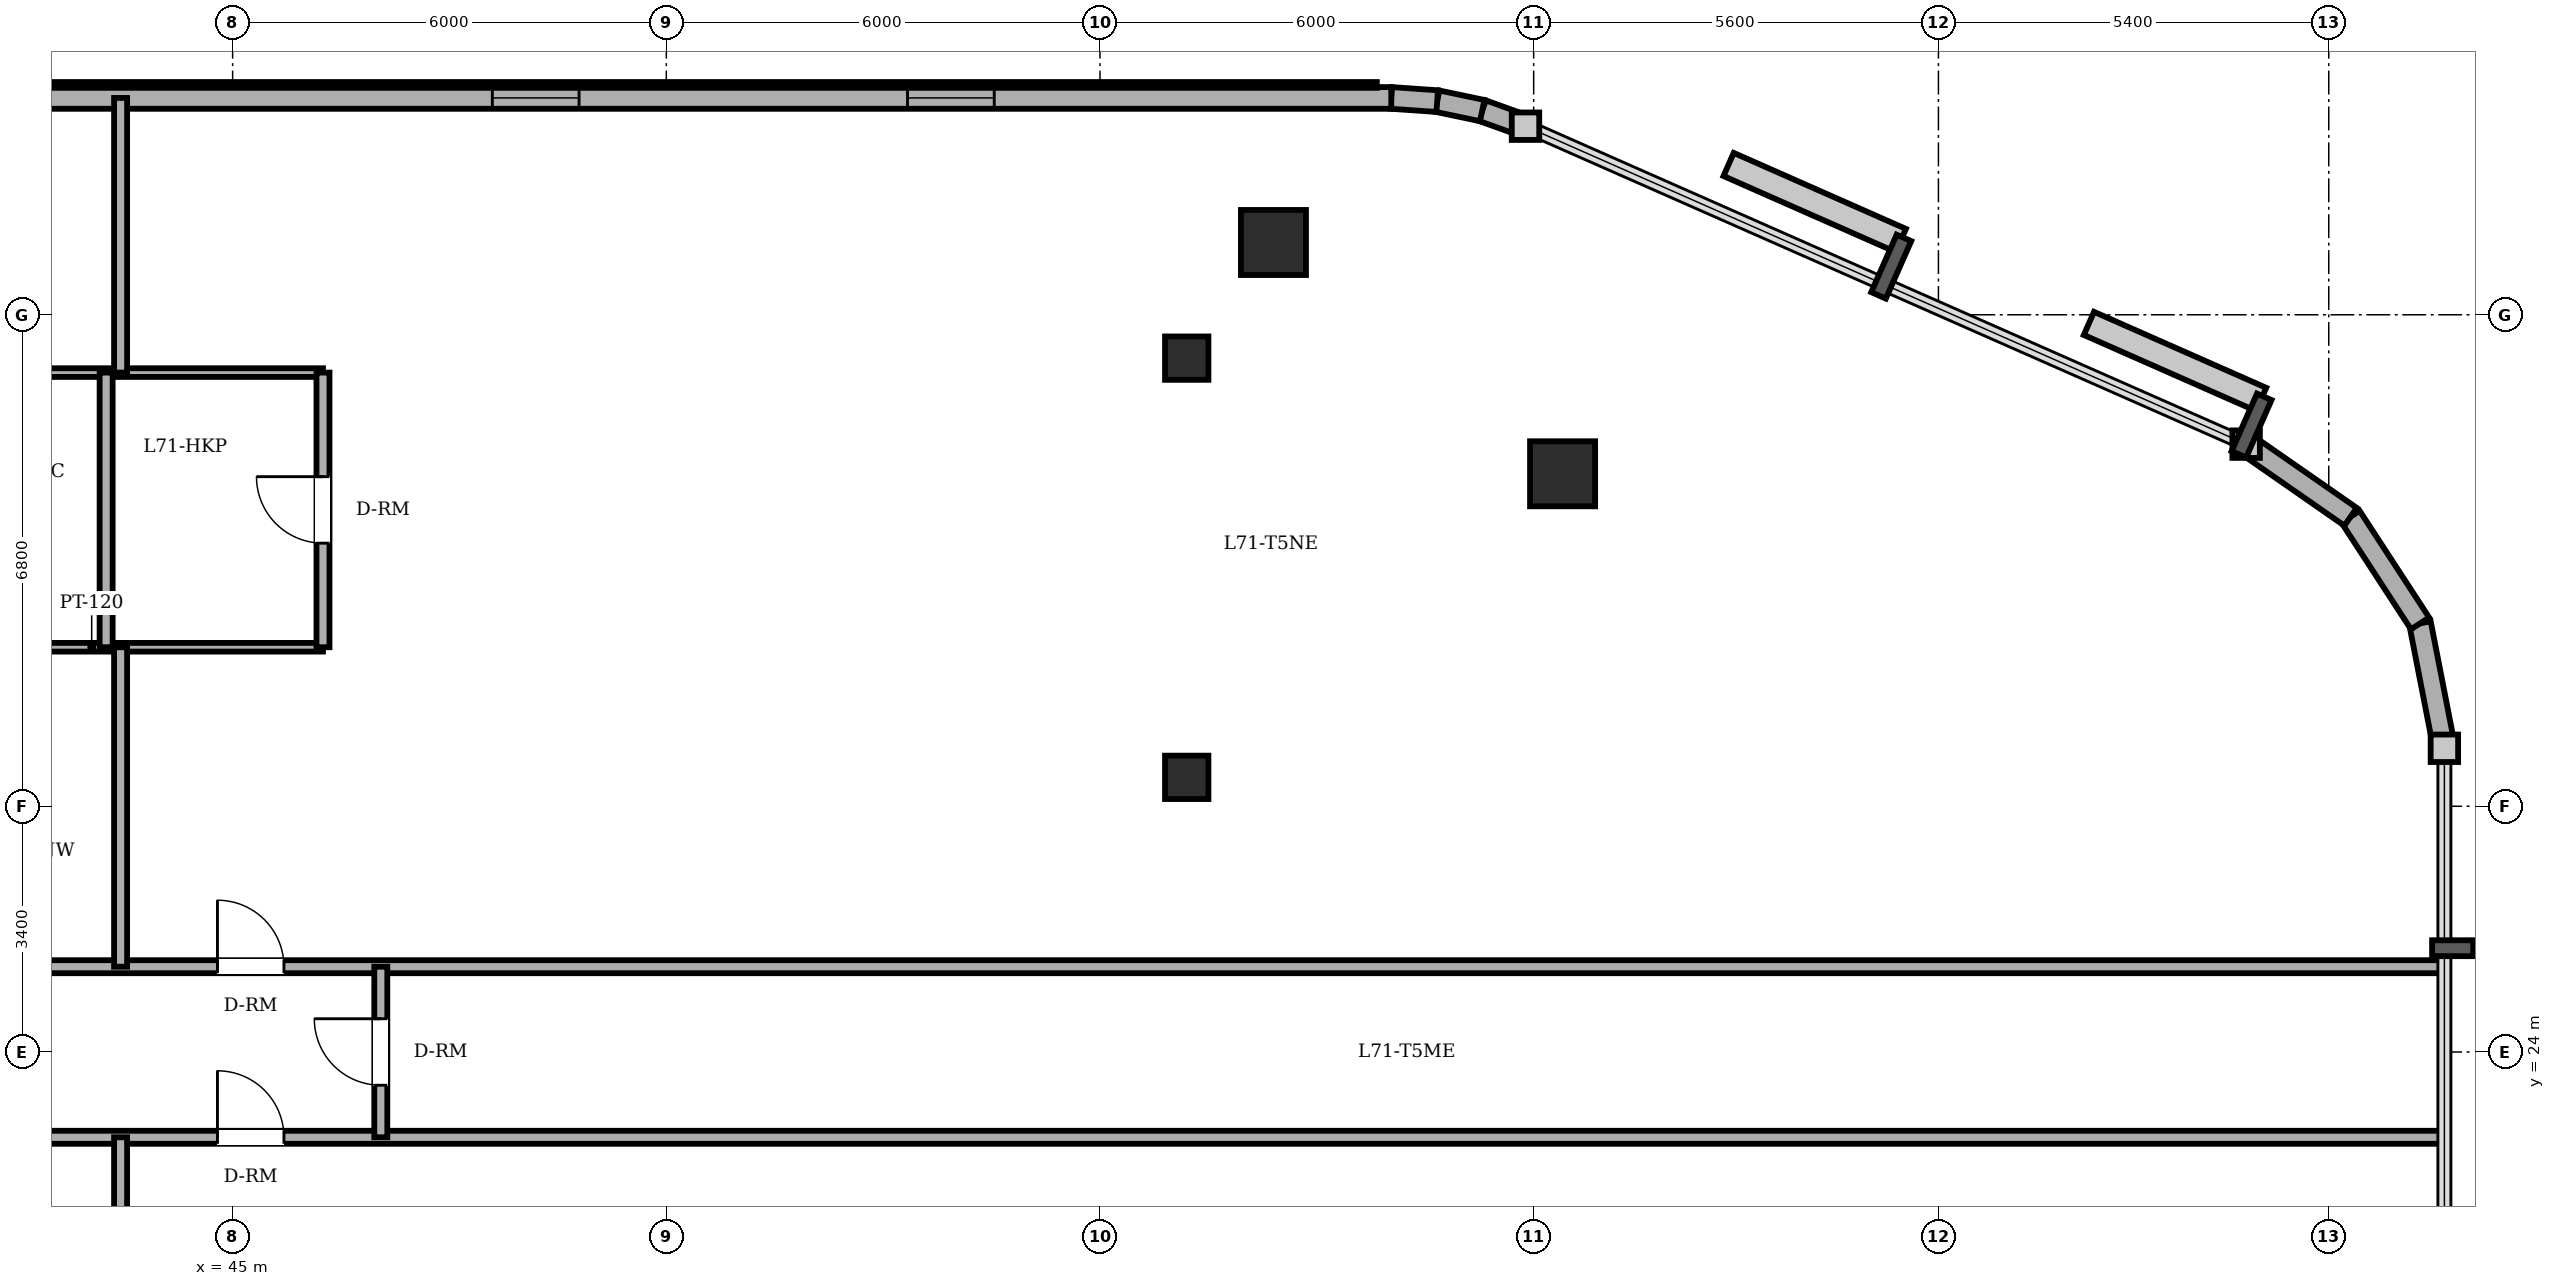
"""IFC4 building model, lengths in metres.
Left out: names, types, materials, properties, quantities, classifications, styles, units other than length and angle.
Written with IfcOpenShell. Run it as: python <this file> out.ifc"""

import sys

from ifc_helpers import new_model, si_unit, direction, frame, frame_2d, origin, origin_2d, place, context, subcontext, project, spatial, rectangle, circle, extrude, element, fill, save


model = new_model("IFC4")
c1 = context("Model", 3, precision=1e-05, world=origin(), true_north=direction((0.0, 1.0)))
c2 = subcontext(c1, "Body", "Model", "MODEL_VIEW")
j1 = project(units=[si_unit("LENGTHUNIT", "METRE"), si_unit("PLANEANGLEUNIT", "RADIAN")], contexts=[c1])
p1 = place(None, origin())
s1 = spatial("IfcSite", under=j1, at=p1, CompositionType="ELEMENT")
p2 = place(p1, origin())
s2 = spatial("IfcBuilding", under=s1, at=p2, CompositionType="ELEMENT")
p3 = place(p2, frame((0.0, 0.0, 273.4)))
s3 = spatial("IfcBuildingStorey", under=s2, at=p3, CompositionType="ELEMENT", Elevation=273.4)
for number, where, z_axis, x_axis in (
    (1, (63.4, 32.0, 0.0), (0.0, 0.0, 1.0), (1.0, 0.0, 0.0)),
    (2, (59.4, 35.2, 0.0), (0.0, 0.0, 1.0), (1.0, 0.0, 0.0)),
):
    element("IfcColumn", number, at=place(p3, frame(where, z_axis=z_axis, x_axis=x_axis)), inside=s3, PredefinedType="COLUMN", context=c2, shape_type="SweptSolid", body=[
        extrude(circle(Radius=0.45, at=origin_2d()), origin(), (0.0, 0.0, 1.0), 3.65),
    ])
for number, where, z_axis, x_axis in (
    (3, (58.2, 27.8, 0.0), (0.0, 0.0, 1.0), (1.0, 0.0, 0.0)),
    (4, (58.2, 33.6, 0.0), (0.0, 0.0, 1.0), (1.0, 0.0, 0.0)),
):
    element("IfcColumn", number, at=place(p3, frame(where, z_axis=z_axis, x_axis=x_axis)), inside=s3, PredefinedType="COLUMN", context=c2, shape_type="SweptSolid", body=[
        extrude(rectangle(XDim=0.6, YDim=0.6, at=origin_2d()), origin(), (0.0, 0.0, 1.0), 3.65),
    ])
for number, where, z_axis, x_axis in (
    (5, (75.6, 28.202, 0.0), (0.0, 0.0, 1.0), (-0.192, 0.981, 0.0)),
    (6, (75.263, 29.93, 0.0), (0.0, 0.0, 1.0), (-0.546, 0.838, 0.0)),
):
    element("IfcWall", number, at=place(p3, frame(where, z_axis=z_axis, x_axis=x_axis)), inside=s3, PredefinedType="SOLIDWALL", context=c2, shape_type="SweptSolid", body=[
        extrude(rectangle(XDim=1.76, YDim=0.3, at=frame_2d((0.88, 0.0))), origin(), (0.0, 0.0, 1.0), 3.45),
    ])
p4 = place(p3, frame((74.302, 31.405, 0.0), z_axis=(0.0, 0.0, 1.0), x_axis=(-0.821006966142, 0.570918174124, 0.0)))
e7 = element("IfcWall", 7, at=p4, inside=s3, PredefinedType="SOLIDWALL", context=c2, shape_type="SweptSolid", body=[
    extrude(rectangle(XDim=1.76, YDim=0.3, at=frame_2d((0.88, 0.0))), origin(), (0.0, 0.0, 1.0), 3.45),
])
p5 = place(p3, frame((62.887, 36.809, 0.0), z_axis=(0.0, 0.0, 1.0), x_axis=(-0.94077491148, 0.339031806665, 0.0)))
e8 = element("IfcWall", 8, at=p5, inside=s3, PredefinedType="SOLIDWALL", context=c2, shape_type="SweptSolid", body=[
    extrude(rectangle(XDim=0.636, YDim=0.3, at=frame_2d((0.318, 0.0))), origin(), (0.0, 0.0, 1.0), 3.45),
])
p6 = place(p3, frame((62.288, 37.025, 0.0), z_axis=(0.0, 0.0, 1.0), x_axis=(-0.97857012251, 0.205913854149, 0.0)))
e9 = element("IfcWall", 9, at=p6, inside=s3, PredefinedType="SOLIDWALL", context=c2, shape_type="SweptSolid", body=[
    extrude(rectangle(XDim=0.637, YDim=0.3, at=frame_2d((0.318, 0.0))), origin(), (0.0, 0.0, 1.0), 3.45),
])
p7 = place(p3, frame((61.665, 37.156, 0.0), z_axis=(0.0, 0.0, 1.0), x_axis=(-0.997613959688, 0.069039028352, 0.0)))
e10 = element("IfcWall", 10, at=p7, inside=s3, PredefinedType="SOLIDWALL", context=c2, shape_type="SweptSolid", body=[
    extrude(rectangle(XDim=0.636, YDim=0.3, at=frame_2d((0.318, 0.0))), origin(), (0.0, 0.0, 1.0), 3.45),
])
p8 = place(p3, frame((61.03, 37.2, 0.0), z_axis=(0.0, 0.0, 1.0), x_axis=(-1.0, 0.0, 0.0)))
e11 = element("IfcWall", 11, at=p8, inside=s3, PredefinedType="SOLIDWALL", context=c2, shape_type="SweptSolid", body=[
    extrude(rectangle(XDim=37.03, YDim=0.3, at=frame_2d((18.515, 0.0))), origin(), (0.0, 0.0, 1.0), 3.45),
])
p9 = place(p8, frame((24.78, 0.0, 0.0)))
e12 = element("IfcOpeningElement", 12, at=p9, cuts=e11, PredefinedType="OPENING", context=c2, shape_type="SweptSolid", body=[
    extrude(rectangle(XDim=0.95, YDim=2.2, at=frame_2d((0.475, 1.1))), frame((0.0, 0.16, 0.0), z_axis=(0.0, -1.0, 0.0), x_axis=(1.0, 0.0, 0.0)), (0.0, 0.0, 1.0), 0.32),
])
p10 = place(p8, frame((5.493, 0.0, 0.85)))
e13 = element("IfcOpeningElement", 13, at=p10, cuts=e11, PredefinedType="OPENING", context=c2, shape_type="SweptSolid", body=[
    extrude(rectangle(XDim=1.2, YDim=1.6, at=frame_2d((0.6, 0.8))), frame((0.0, 0.16, 0.0), z_axis=(0.0, -1.0, 0.0), x_axis=(1.0, 0.0, 0.0)), (0.0, 0.0, 1.0), 0.32),
])
p11 = place(p8, frame((11.237, 0.0, 0.85)))
e14 = element("IfcOpeningElement", 14, at=p11, cuts=e11, PredefinedType="OPENING", context=c2, shape_type="SweptSolid", body=[
    extrude(rectangle(XDim=1.2, YDim=1.6, at=frame_2d((0.6, 0.8))), frame((0.0, 0.16, 0.0), z_axis=(0.0, -1.0, 0.0), x_axis=(1.0, 0.0, 0.0)), (0.0, 0.0, 1.0), 0.32),
])
p12 = place(p8, frame((18.78, 0.0, 0.85)))
e15 = element("IfcOpeningElement", 15, at=p12, cuts=e11, PredefinedType="OPENING", context=c2, shape_type="SweptSolid", body=[
    extrude(rectangle(XDim=1.2, YDim=1.6, at=frame_2d((0.6, 0.8))), frame((0.0, 0.16, 0.0), z_axis=(0.0, -1.0, 0.0), x_axis=(1.0, 0.0, 0.0)), (0.0, 0.0, 1.0), 0.32),
])
p13 = place(p8, frame((30.913, 0.0, 0.85)))
e16 = element("IfcOpeningElement", 16, at=p13, cuts=e11, PredefinedType="OPENING", context=c2, shape_type="SweptSolid", body=[
    extrude(rectangle(XDim=1.2, YDim=1.6, at=frame_2d((0.6, 0.8))), frame((0.0, 0.16, 0.0), z_axis=(0.0, -1.0, 0.0), x_axis=(1.0, 0.0, 0.0)), (0.0, 0.0, 1.0), 0.32),
])
p14 = place(p3, frame((39.85, 22.82, 0.0), z_axis=(0.0, 0.0, 1.0), x_axis=(1.0, 0.0, 0.0)))
e17 = element("IfcWall", 17, at=p14, inside=s3, PredefinedType="PARTITIONING", context=c2, shape_type="SweptSolid", body=[
    extrude(rectangle(XDim=35.75, YDim=0.18, at=frame_2d((17.875, 0.0))), origin(), (0.0, 0.0, 1.0), 3.45),
])
p15 = place(p14, frame((4.94, 0.0, 0.0)))
e18 = element("IfcOpeningElement", 18, at=p15, cuts=e17, PredefinedType="OPENING", context=c2, shape_type="SweptSolid", body=[
    extrude(rectangle(XDim=0.92, YDim=2.1, at=frame_2d((0.46, 1.05))), frame((0.0, 0.1, 0.0), z_axis=(0.0, -1.0, 0.0), x_axis=(1.0, 0.0, 0.0)), (0.0, 0.0, 1.0), 0.2),
])
p16 = place(p3, frame((39.85, 25.18, 0.0), z_axis=(0.0, 0.0, 1.0), x_axis=(1.0, 0.0, 0.0)))
e19 = element("IfcWall", 19, at=p16, inside=s3, PredefinedType="PARTITIONING", context=c2, shape_type="SweptSolid", body=[
    extrude(rectangle(XDim=35.75, YDim=0.18, at=frame_2d((17.875, 0.0))), origin(), (0.0, 0.0, 1.0), 3.45),
])
p17 = place(p16, frame((4.94, 0.0, 0.0)))
e20 = element("IfcOpeningElement", 20, at=p17, cuts=e19, PredefinedType="OPENING", context=c2, shape_type="SweptSolid", body=[
    extrude(rectangle(XDim=0.92, YDim=2.1, at=frame_2d((0.46, 1.05))), frame((0.0, 0.1, 0.0), z_axis=(0.0, -1.0, 0.0), x_axis=(1.0, 0.0, 0.0)), (0.0, 0.0, 1.0), 0.2),
])
p18 = place(p3, frame((39.85, 29.6, 0.0), z_axis=(0.0, 0.0, 1.0), x_axis=(1.0, 0.0, 0.0)))
e21 = element("IfcWall", 21, at=p18, inside=s3, PredefinedType="PARTITIONING", context=c2, shape_type="SweptSolid", body=[
    extrude(rectangle(XDim=6.4, YDim=0.12, at=frame_2d((3.2, 0.0))), origin(), (0.0, 0.0, 1.0), 3.45),
])
p19 = place(p3, frame((39.85, 33.4, 0.0), z_axis=(0.0, 0.0, 1.0), x_axis=(1.0, 0.0, 0.0)))
e22 = element("IfcWall", 22, at=p19, inside=s3, PredefinedType="PARTITIONING", context=c2, shape_type="SweptSolid", body=[
    extrude(rectangle(XDim=6.4, YDim=0.12, at=frame_2d((3.2, 0.0))), origin(), (0.0, 0.0, 1.0), 3.092),
])
p20 = place(p3, frame((43.25, 29.6, 0.0), z_axis=(0.0, 0.0, 1.0), x_axis=(0.0, 1.0, 0.0)))
e23 = element("IfcWall", 23, at=p20, inside=s3, PredefinedType="PARTITIONING", context=c2, shape_type="SweptSolid", body=[
    extrude(rectangle(XDim=3.8, YDim=0.18, at=frame_2d((1.9, 0.0))), origin(), (0.0, 0.0, 1.0), 3.45),
])
p21 = place(p3, frame((43.45, 10.8, 0.0), z_axis=(0.0, 0.0, 1.0), x_axis=(0.0, 1.0, 0.0)))
e24 = element("IfcWall", 24, at=p21, inside=s3, PredefinedType="PARTITIONING", context=c2, shape_type="SweptSolid", body=[
    extrude(rectangle(XDim=12.02, YDim=0.18, at=frame_2d((6.01, 0.0))), origin(), (0.0, 0.0, 1.0), 3.45),
])
p22 = place(p3, frame((43.45, 25.18, 0.0), z_axis=(0.0, 0.0, 1.0), x_axis=(0.0, 1.0, 0.0)))
e25 = element("IfcWall", 25, at=p22, inside=s3, PredefinedType="PARTITIONING", context=c2, shape_type="SweptSolid", body=[
    extrude(rectangle(XDim=4.42, YDim=0.18, at=frame_2d((2.21, 0.0))), origin(), (0.0, 0.0, 1.0), 3.45),
])
p23 = place(p3, frame((43.45, 33.4, 0.0), z_axis=(0.0, 0.0, 1.0), x_axis=(0.0, 1.0, 0.0)))
e26 = element("IfcWall", 26, at=p23, inside=s3, PredefinedType="PARTITIONING", context=c2, shape_type="SweptSolid", body=[
    extrude(rectangle(XDim=3.8, YDim=0.18, at=frame_2d((1.9, 0.0))), origin(), (0.0, 0.0, 1.0), 3.45),
])
p24 = place(p3, frame((46.25, 29.6, 0.0), z_axis=(0.0, 0.0, 1.0), x_axis=(0.0, 1.0, 0.0)))
e27 = element("IfcWall", 27, at=p24, inside=s3, PredefinedType="PARTITIONING", context=c2, shape_type="SweptSolid", body=[
    extrude(rectangle(XDim=3.8, YDim=0.18, at=frame_2d((1.9, 0.0))), origin(), (0.0, 0.0, 1.0), 3.45),
])
p25 = place(p24, frame((1.44, 0.0, 0.0)))
e28 = element("IfcOpeningElement", 28, at=p25, cuts=e27, PredefinedType="OPENING", context=c2, shape_type="SweptSolid", body=[
    extrude(rectangle(XDim=0.92, YDim=2.1, at=frame_2d((0.46, 1.05))), frame((0.0, 0.1, 0.0), z_axis=(0.0, -1.0, 0.0), x_axis=(1.0, 0.0, 0.0)), (0.0, 0.0, 1.0), 0.2),
])
p26 = place(p3, frame((47.05, 22.82, 0.0), z_axis=(0.0, 0.0, 1.0), x_axis=(0.0, 1.0, 0.0)))
e29 = element("IfcWall", 29, at=p26, inside=s3, PredefinedType="PARTITIONING", context=c2, shape_type="SweptSolid", body=[
    extrude(rectangle(XDim=2.36, YDim=0.18, at=frame_2d((1.18, 0.0))), origin(), (0.0, 0.0, 1.0), 3.45),
])
p27 = place(p26, frame((0.72, 0.0, 0.0)))
e30 = element("IfcOpeningElement", 30, at=p27, cuts=e29, PredefinedType="OPENING", context=c2, shape_type="SweptSolid", body=[
    extrude(rectangle(XDim=0.92, YDim=2.1, at=frame_2d((0.46, 1.05))), frame((0.0, 0.1, 0.0), z_axis=(0.0, -1.0, 0.0), x_axis=(1.0, 0.0, 0.0)), (0.0, 0.0, 1.0), 0.2),
])
p28 = place(p10, origin())
e31 = element("IfcWindow", 31, at=p28, inside=s3, PartitioningType="SINGLE_PANEL", PredefinedType="WINDOW", context=c2, shape_type="SweptSolid", body=[
    extrude(rectangle(XDim=1.2, YDim=1.6, at=frame_2d((0.6, 0.8))), frame((0.0, 0.03, 0.0), z_axis=(0.0, -1.0, 0.0), x_axis=(1.0, 0.0, 0.0)), (0.0, 0.0, 1.0), 0.06),
])
fill(e13, e31)
p29 = place(p11, origin())
e32 = element("IfcWindow", 32, at=p29, inside=s3, PartitioningType="SINGLE_PANEL", PredefinedType="WINDOW", context=c2, shape_type="SweptSolid", body=[
    extrude(rectangle(XDim=1.2, YDim=1.6, at=frame_2d((0.6, 0.8))), frame((0.0, 0.03, 0.0), z_axis=(0.0, -1.0, 0.0), x_axis=(1.0, 0.0, 0.0)), (0.0, 0.0, 1.0), 0.06),
])
fill(e14, e32)
p30 = place(p17, origin())
e33 = element("IfcDoor", 33, at=p30, inside=s3, OperationType="SINGLE_SWING_LEFT", PredefinedType="DOOR", context=c2, shape_type="SweptSolid", body=[
    extrude(rectangle(XDim=0.92, YDim=2.1, at=frame_2d((0.46, 1.05))), frame((0.0, 0.025, 0.0), z_axis=(0.0, -1.0, 0.0), x_axis=(1.0, 0.0, 0.0)), (0.0, 0.0, 1.0), 0.05),
])
fill(e20, e33)
p31 = place(p27, origin())
e34 = element("IfcDoor", 34, at=p31, inside=s3, OperationType="SINGLE_SWING_RIGHT", PredefinedType="DOOR", context=c2, shape_type="SweptSolid", body=[
    extrude(rectangle(XDim=0.92, YDim=2.1, at=frame_2d((0.46, 1.05))), frame((0.0, 0.025, 0.0), z_axis=(0.0, -1.0, 0.0), x_axis=(1.0, 0.0, 0.0)), (0.0, 0.0, 1.0), 0.05),
])
fill(e30, e34)
p32 = place(p15, origin())
e35 = element("IfcDoor", 35, at=p32, inside=s3, OperationType="SINGLE_SWING_LEFT", PredefinedType="DOOR", context=c2, shape_type="SweptSolid", body=[
    extrude(rectangle(XDim=0.92, YDim=2.1, at=frame_2d((0.46, 1.05))), frame((0.0, 0.025, 0.0), z_axis=(0.0, -1.0, 0.0), x_axis=(1.0, 0.0, 0.0)), (0.0, 0.0, 1.0), 0.05),
])
fill(e18, e35)
p33 = place(p25, origin())
e36 = element("IfcDoor", 36, at=p33, inside=s3, OperationType="SINGLE_SWING_RIGHT", PredefinedType="DOOR", context=c2, shape_type="SweptSolid", body=[
    extrude(rectangle(XDim=0.92, YDim=2.1, at=frame_2d((0.46, 1.05))), frame((0.0, 0.025, 0.0), z_axis=(0.0, -1.0, 0.0), x_axis=(1.0, 0.0, 0.0)), (0.0, 0.0, 1.0), 0.05),
])
fill(e28, e36)
save(model, sys.argv[1])
